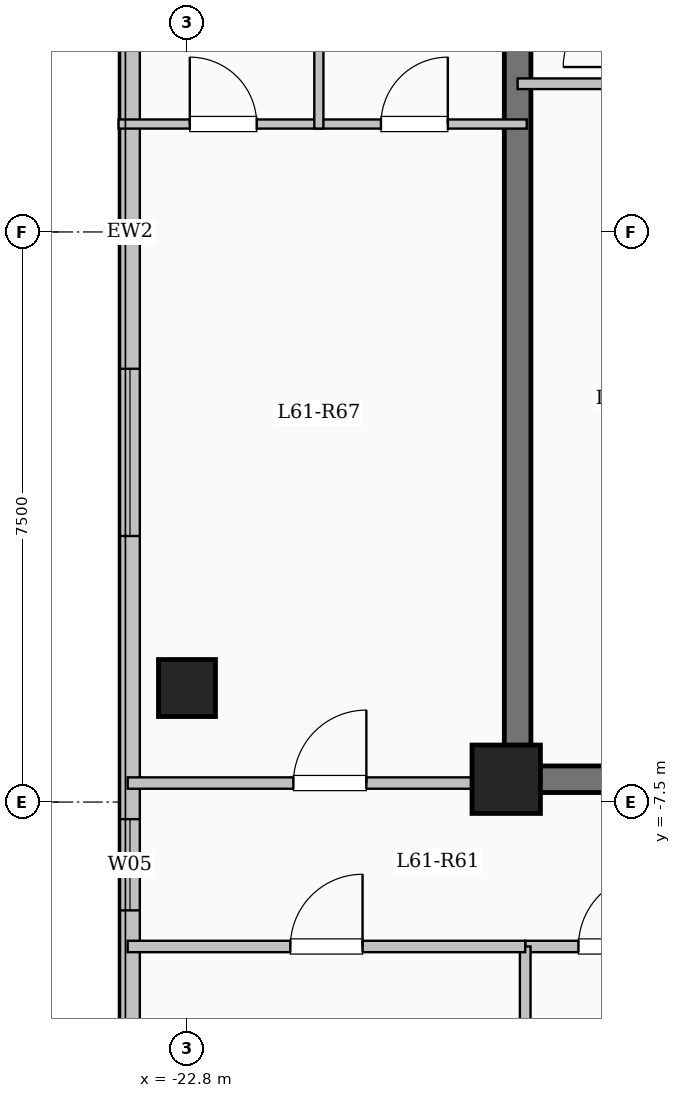
"""IFC4 building model, lengths in metres.
Left out: names, types, materials, properties, quantities, classifications, styles, units other than length and angle.
Written with IfcOpenShell. Run it as: python <this file> out.ifc"""

import sys

from ifc_helpers import new_model, si_unit, direction, frame, frame_2d, origin, origin_2d, place, context, subcontext, project, spatial, rectangle, extrude, element, fill, save


model = new_model("IFC4")
c1 = context("Model", 3, precision=1e-05, world=origin(), true_north=direction((0.0, 1.0)))
c2 = subcontext(c1, "Body", "Model", "MODEL_VIEW")
j1 = project(units=[si_unit("LENGTHUNIT", "METRE"), si_unit("PLANEANGLEUNIT", "RADIAN")], contexts=[c1])
p1 = place(None, origin())
s1 = spatial("IfcSite", under=j1, at=p1, CompositionType="ELEMENT")
p2 = place(p1, origin())
s2 = spatial("IfcBuilding", under=s1, at=p2, CompositionType="ELEMENT")
p3 = place(p2, frame((0.0, 0.0, 223.75)))
s3 = spatial("IfcBuildingStorey", under=s2, at=p3, CompositionType="ELEMENT", Elevation=223.75)
p4 = place(p3, frame((-18.6, -7.2, 0.0), z_axis=(0.0, 0.0, 1.0), x_axis=(1.0, 0.0, 0.0)))
e1 = element("IfcColumn", 1, at=p4, inside=s3, PredefinedType="COLUMN", context=c2, shape_type="SweptSolid", body=[
    extrude(rectangle(XDim=0.9, YDim=0.9, at=origin_2d()), origin(), (0.0, 0.0, 1.0), 3.35),
])
p5 = place(p3, frame((-22.8, -6.0, 0.0), z_axis=(0.0, 0.0, 1.0), x_axis=(1.0, 0.0, 0.0)))
e2 = element("IfcColumn", 2, at=p5, inside=s3, PredefinedType="COLUMN", context=c2, shape_type="SweptSolid", body=[
    extrude(rectangle(XDim=0.75, YDim=0.75, at=origin_2d()), origin(), (0.0, 0.0, 1.0), 3.35),
])
p6 = place(p3, frame((-23.55, -17.25, 0.0), z_axis=(0.0, 0.0, 1.0), x_axis=(0.0, 1.0, 0.0)))
e3 = element("IfcWall", 3, at=p6, inside=s3, PredefinedType="SOLIDWALL", context=c2, shape_type="SweptSolid", body=[
    extrude(rectangle(XDim=34.5, YDim=0.26, at=frame_2d((17.25, 0.0))), origin(), (0.0, 0.0, 1.0), 3.05),
])
p7 = place(p6, frame((2.825, 0.0, 0.9)))
e4 = element("IfcOpeningElement", 4, at=p7, cuts=e3, PredefinedType="OPENING", context=c2, shape_type="SweptSolid", body=[
    extrude(rectangle(XDim=2.2, YDim=1.75, at=frame_2d((1.1, 0.875))), frame((0.0, 0.14, 0.0), z_axis=(0.0, -1.0, 0.0), x_axis=(1.0, 0.0, 0.0)), (0.0, 0.0, 1.0), 0.28),
])
p8 = place(p6, frame((8.325, 0.0, 0.95)))
e5 = element("IfcOpeningElement", 5, at=p8, cuts=e3, PredefinedType="OPENING", context=c2, shape_type="SweptSolid", body=[
    extrude(rectangle(XDim=1.2, YDim=1.5, at=frame_2d((0.6, 0.75))), frame((0.0, 0.14, 0.0), z_axis=(0.0, -1.0, 0.0), x_axis=(1.0, 0.0, 0.0)), (0.0, 0.0, 1.0), 0.28),
])
p9 = place(p6, frame((13.25, 0.0, 0.9)))
e6 = element("IfcOpeningElement", 6, at=p9, cuts=e3, PredefinedType="OPENING", context=c2, shape_type="SweptSolid", body=[
    extrude(rectangle(XDim=2.2, YDim=1.75, at=frame_2d((1.1, 0.875))), frame((0.0, 0.14, 0.0), z_axis=(0.0, -1.0, 0.0), x_axis=(1.0, 0.0, 0.0)), (0.0, 0.0, 1.0), 0.28),
])
p10 = place(p6, frame((19.65, 0.0, 0.9)))
e7 = element("IfcOpeningElement", 7, at=p10, cuts=e3, PredefinedType="OPENING", context=c2, shape_type="SweptSolid", body=[
    extrude(rectangle(XDim=1.65, YDim=1.6, at=frame_2d((0.825, 0.8))), frame((0.0, 0.14, 0.0), z_axis=(0.0, -1.0, 0.0), x_axis=(1.0, 0.0, 0.0)), (0.0, 0.0, 1.0), 0.28),
])
p11 = place(p6, frame((24.125, 0.0, 0.9)))
e8 = element("IfcOpeningElement", 8, at=p11, cuts=e3, PredefinedType="OPENING", context=c2, shape_type="SweptSolid", body=[
    extrude(rectangle(XDim=2.0, YDim=1.7, at=frame_2d((1.0, 0.85))), frame((0.0, 0.14, 0.0), z_axis=(0.0, -1.0, 0.0), x_axis=(1.0, 0.0, 0.0)), (0.0, 0.0, 1.0), 0.28),
])
p12 = place(p6, frame((28.375, 0.0, 0.95)))
e9 = element("IfcOpeningElement", 9, at=p12, cuts=e3, PredefinedType="OPENING", context=c2, shape_type="SweptSolid", body=[
    extrude(rectangle(XDim=1.0, YDim=1.5, at=frame_2d((0.5, 0.75))), frame((0.0, 0.14, 0.0), z_axis=(0.0, -1.0, 0.0), x_axis=(1.0, 0.0, 0.0)), (0.0, 0.0, 1.0), 0.28),
])
p13 = place(p6, frame((31.125, 0.0, 0.9)))
e10 = element("IfcOpeningElement", 10, at=p13, cuts=e3, PredefinedType="OPENING", context=c2, shape_type="SweptSolid", body=[
    extrude(rectangle(XDim=2.0, YDim=1.7, at=frame_2d((1.0, 0.85))), frame((0.0, 0.14, 0.0), z_axis=(0.0, -1.0, 0.0), x_axis=(1.0, 0.0, 0.0)), (0.0, 0.0, 1.0), 0.28),
])
p14 = place(p3, frame((-18.45, -7.375, 0.0), z_axis=(0.0, 0.0, 1.0), x_axis=(0.0, 1.0, 0.0)))
e11 = element("IfcWall", 11, at=p14, inside=s3, PredefinedType="SHEAR", context=c2, shape_type="SweptSolid", body=[
    extrude(rectangle(XDim=14.05, YDim=0.35, at=frame_2d((7.025, 0.0))), origin(), (0.0, 0.0, 1.0), 3.35),
])
p15 = place(p3, frame((-18.625, -7.2, 0.0), z_axis=(0.0, 0.0, 1.0), x_axis=(1.0, 0.0, 0.0)))
e12 = element("IfcWall", 12, at=p15, inside=s3, PredefinedType="SHEAR", context=c2, shape_type="SweptSolid", body=[
    extrude(rectangle(XDim=6.0, YDim=0.35, at=frame_2d((3.0, 0.0))), origin(), (0.0, 0.0, 1.0), 3.35),
])
p16 = place(p15, frame((1.725, 0.0, 0.0)))
e13 = element("IfcOpeningElement", 13, at=p16, cuts=e12, PredefinedType="OPENING", context=c2, shape_type="SweptSolid", body=[
    extrude(rectangle(XDim=1.12, YDim=2.15, at=frame_2d((0.56, 1.075))), frame((0.0, 0.185, 0.0), z_axis=(0.0, -1.0, 0.0), x_axis=(1.0, 0.0, 0.0)), (0.0, 0.0, 1.0), 0.37),
])
p17 = place(p3, frame((-18.45, 1.95, 0.0), z_axis=(0.0, 0.0, 1.0), x_axis=(1.0, 0.0, 0.0)))
e14 = element("IfcWall", 14, at=p17, inside=s3, PredefinedType="PARTITIONING", context=c2, shape_type="SweptSolid", body=[
    extrude(rectangle(XDim=3.15, YDim=0.14, at=frame_2d((1.575, 0.0))), origin(), (0.0, 0.0, 1.0), 3.05),
])
p18 = place(p17, frame((1.9, 0.0, 0.0)))
e15 = element("IfcOpeningElement", 15, at=p18, cuts=e14, PredefinedType="OPENING", context=c2, shape_type="SweptSolid", body=[
    extrude(rectangle(XDim=0.9, YDim=2.08, at=frame_2d((0.45, 1.04))), frame((0.0, 0.08, 0.0), z_axis=(0.0, -1.0, 0.0), x_axis=(1.0, 0.0, 0.0)), (0.0, 0.0, 1.0), 0.16),
])
p19 = place(p3, frame((-18.35, -9.4, 0.0), z_axis=(0.0, 0.0, 1.0), x_axis=(1.0, 0.0, 0.0)))
e16 = element("IfcWall", 16, at=p19, inside=s3, PredefinedType="PARTITIONING", context=c2, shape_type="SweptSolid", body=[
    extrude(rectangle(XDim=9.8, YDim=0.15, at=frame_2d((4.9, 0.0))), origin(), (0.0, 0.0, 1.0), 3.05),
])
p20 = place(p19, frame((0.7, 0.0, 0.0)))
e17 = element("IfcOpeningElement", 17, at=p20, cuts=e16, PredefinedType="OPENING", context=c2, shape_type="SweptSolid", body=[
    extrude(rectangle(XDim=0.96, YDim=2.15, at=frame_2d((0.48, 1.075))), frame((0.0, 0.085, 0.0), z_axis=(0.0, -1.0, 0.0), x_axis=(1.0, 0.0, 0.0)), (0.0, 0.0, 1.0), 0.17),
])
p21 = place(p19, frame((5.38, 0.0, 0.0)))
e18 = element("IfcOpeningElement", 18, at=p21, cuts=e16, PredefinedType="OPENING", context=c2, shape_type="SweptSolid", body=[
    extrude(rectangle(XDim=0.96, YDim=2.15, at=frame_2d((0.48, 1.075))), frame((0.0, 0.085, 0.0), z_axis=(0.0, -1.0, 0.0), x_axis=(1.0, 0.0, 0.0)), (0.0, 0.0, 1.0), 0.17),
])
p22 = place(p3, frame((-23.58, -7.25, 0.0), z_axis=(0.0, 0.0, 1.0), x_axis=(1.0, 0.0, 0.0)))
e19 = element("IfcWall", 19, at=p22, inside=s3, PredefinedType="PARTITIONING", context=c2, shape_type="SweptSolid", body=[
    extrude(rectangle(XDim=5.13, YDim=0.15, at=frame_2d((2.565, 0.0))), origin(), (0.0, 0.0, 1.0), 3.05),
])
p23 = place(p22, frame((2.18, 0.0, 0.0)))
e20 = element("IfcOpeningElement", 20, at=p23, cuts=e19, PredefinedType="OPENING", context=c2, shape_type="SweptSolid", body=[
    extrude(rectangle(XDim=0.96, YDim=2.15, at=frame_2d((0.48, 1.075))), frame((0.0, 0.085, 0.0), z_axis=(0.0, -1.0, 0.0), x_axis=(1.0, 0.0, 0.0)), (0.0, 0.0, 1.0), 0.17),
])
p24 = place(p3, frame((-18.35, -17.25, 0.0), z_axis=(0.0, 0.0, 1.0), x_axis=(0.0, 1.0, 0.0)))
e21 = element("IfcWall", 21, at=p24, inside=s3, PredefinedType="PARTITIONING", context=c2, shape_type="SweptSolid", body=[
    extrude(rectangle(XDim=7.85, YDim=0.14, at=frame_2d((3.925, 0.0))), origin(), (0.0, 0.0, 1.0), 3.05),
])
p25 = place(p3, frame((-23.58, -9.4, 0.0), z_axis=(0.0, 0.0, 1.0), x_axis=(1.0, 0.0, 0.0)))
e22 = element("IfcWall", 22, at=p25, inside=s3, PredefinedType="PARTITIONING", context=c2, shape_type="SweptSolid", body=[
    extrude(rectangle(XDim=5.23, YDim=0.15, at=frame_2d((2.615, 0.0))), origin(), (0.0, 0.0, 1.0), 3.05),
])
p26 = place(p25, frame((2.14, 0.0, 0.0)))
e23 = element("IfcOpeningElement", 23, at=p26, cuts=e22, PredefinedType="OPENING", context=c2, shape_type="SweptSolid", body=[
    extrude(rectangle(XDim=0.95, YDim=2.15, at=frame_2d((0.475, 1.075))), frame((0.0, 0.085, 0.0), z_axis=(0.0, -1.0, 0.0), x_axis=(1.0, 0.0, 0.0)), (0.0, 0.0, 1.0), 0.17),
])
p27 = place(p3, frame((-23.7, 1.42, 0.0), z_axis=(0.0, 0.0, 1.0), x_axis=(1.0, 0.0, 0.0)))
e24 = element("IfcWall", 24, at=p27, inside=s3, PredefinedType="PARTITIONING", context=c2, shape_type="SweptSolid", body=[
    extrude(rectangle(XDim=5.37, YDim=0.12, at=frame_2d((2.685, 0.0))), origin(), (0.0, 0.0, 1.0), 3.05),
])
p28 = place(p27, frame((0.937, 0.0, 0.0)))
e25 = element("IfcOpeningElement", 25, at=p28, cuts=e24, PredefinedType="OPENING", context=c2, shape_type="SweptSolid", body=[
    extrude(rectangle(XDim=0.88, YDim=2.1, at=frame_2d((0.44, 1.05))), frame((0.0, 0.07, 0.0), z_axis=(0.0, -1.0, 0.0), x_axis=(1.0, 0.0, 0.0)), (0.0, 0.0, 1.0), 0.14),
])
p29 = place(p27, frame((3.452, 0.0, 0.0)))
e26 = element("IfcOpeningElement", 26, at=p29, cuts=e24, PredefinedType="OPENING", context=c2, shape_type="SweptSolid", body=[
    extrude(rectangle(XDim=0.88, YDim=2.1, at=frame_2d((0.44, 1.05))), frame((0.0, 0.07, 0.0), z_axis=(0.0, -1.0, 0.0), x_axis=(1.0, 0.0, 0.0)), (0.0, 0.0, 1.0), 0.14),
])
p30 = place(p3, frame((-21.065, 1.36, 0.0), z_axis=(0.0, 0.0, 1.0), x_axis=(0.0, 1.0, 0.0)))
e27 = element("IfcWall", 27, at=p30, inside=s3, PredefinedType="PARTITIONING", context=c2, shape_type="SweptSolid", body=[
    extrude(rectangle(XDim=3.58, YDim=0.12, at=frame_2d((1.79, 0.0))), origin(), (0.0, 0.0, 1.0), 3.05),
])
p31 = place(p8, origin())
e28 = element("IfcWindow", 28, at=p31, inside=s3, PartitioningType="SINGLE_PANEL", PredefinedType="WINDOW", context=c2, shape_type="SweptSolid", body=[
    extrude(rectangle(XDim=1.2, YDim=1.5, at=frame_2d((0.6, 0.75))), frame((0.0, 0.03, 0.0), z_axis=(0.0, -1.0, 0.0), x_axis=(1.0, 0.0, 0.0)), (0.0, 0.0, 1.0), 0.06),
])
fill(e5, e28)
p32 = place(p9, origin())
e29 = element("IfcWindow", 29, at=p32, inside=s3, PartitioningType="SINGLE_PANEL", PredefinedType="WINDOW", context=c2, shape_type="SweptSolid", body=[
    extrude(rectangle(XDim=2.2, YDim=1.75, at=frame_2d((1.1, 0.875))), frame((0.0, 0.03, 0.0), z_axis=(0.0, -1.0, 0.0), x_axis=(1.0, 0.0, 0.0)), (0.0, 0.0, 1.0), 0.06),
])
fill(e6, e29)
p33 = place(p20, origin())
e30 = element("IfcDoor", 30, at=p33, inside=s3, OperationType="SINGLE_SWING_RIGHT", PredefinedType="DOOR", context=c2, shape_type="SweptSolid", body=[
    extrude(rectangle(XDim=0.96, YDim=2.15, at=frame_2d((0.48, 1.075))), frame((0.0, 0.025, 0.0), z_axis=(0.0, -1.0, 0.0), x_axis=(1.0, 0.0, 0.0)), (0.0, 0.0, 1.0), 0.05),
])
fill(e17, e30)
p34 = place(p26, origin())
e31 = element("IfcDoor", 31, at=p34, inside=s3, OperationType="SINGLE_SWING_RIGHT", PredefinedType="DOOR", context=c2, shape_type="SweptSolid", body=[
    extrude(rectangle(XDim=0.95, YDim=2.15, at=frame_2d((0.475, 1.075))), frame((0.0, 0.025, 0.0), z_axis=(0.0, -1.0, 0.0), x_axis=(1.0, 0.0, 0.0)), (0.0, 0.0, 1.0), 0.05),
])
fill(e23, e31)
p35 = place(p23, origin())
e32 = element("IfcDoor", 32, at=p35, inside=s3, OperationType="SINGLE_SWING_RIGHT", PredefinedType="DOOR", context=c2, shape_type="SweptSolid", body=[
    extrude(rectangle(XDim=0.96, YDim=2.15, at=frame_2d((0.48, 1.075))), frame((0.0, 0.025, 0.0), z_axis=(0.0, -1.0, 0.0), x_axis=(1.0, 0.0, 0.0)), (0.0, 0.0, 1.0), 0.05),
])
fill(e20, e32)
p36 = place(p28, origin())
e33 = element("IfcDoor", 33, at=p36, inside=s3, OperationType="SINGLE_SWING_LEFT", PredefinedType="DOOR", context=c2, shape_type="SweptSolid", body=[
    extrude(rectangle(XDim=0.88, YDim=2.1, at=frame_2d((0.44, 1.05))), frame((0.0, 0.025, 0.0), z_axis=(0.0, -1.0, 0.0), x_axis=(1.0, 0.0, 0.0)), (0.0, 0.0, 1.0), 0.05),
])
fill(e25, e33)
p37 = place(p29, origin())
e34 = element("IfcDoor", 34, at=p37, inside=s3, OperationType="SINGLE_SWING_RIGHT", PredefinedType="DOOR", context=c2, shape_type="SweptSolid", body=[
    extrude(rectangle(XDim=0.88, YDim=2.1, at=frame_2d((0.44, 1.05))), frame((0.0, 0.025, 0.0), z_axis=(0.0, -1.0, 0.0), x_axis=(1.0, 0.0, 0.0)), (0.0, 0.0, 1.0), 0.05),
])
fill(e26, e34)
save(model, sys.argv[1])
